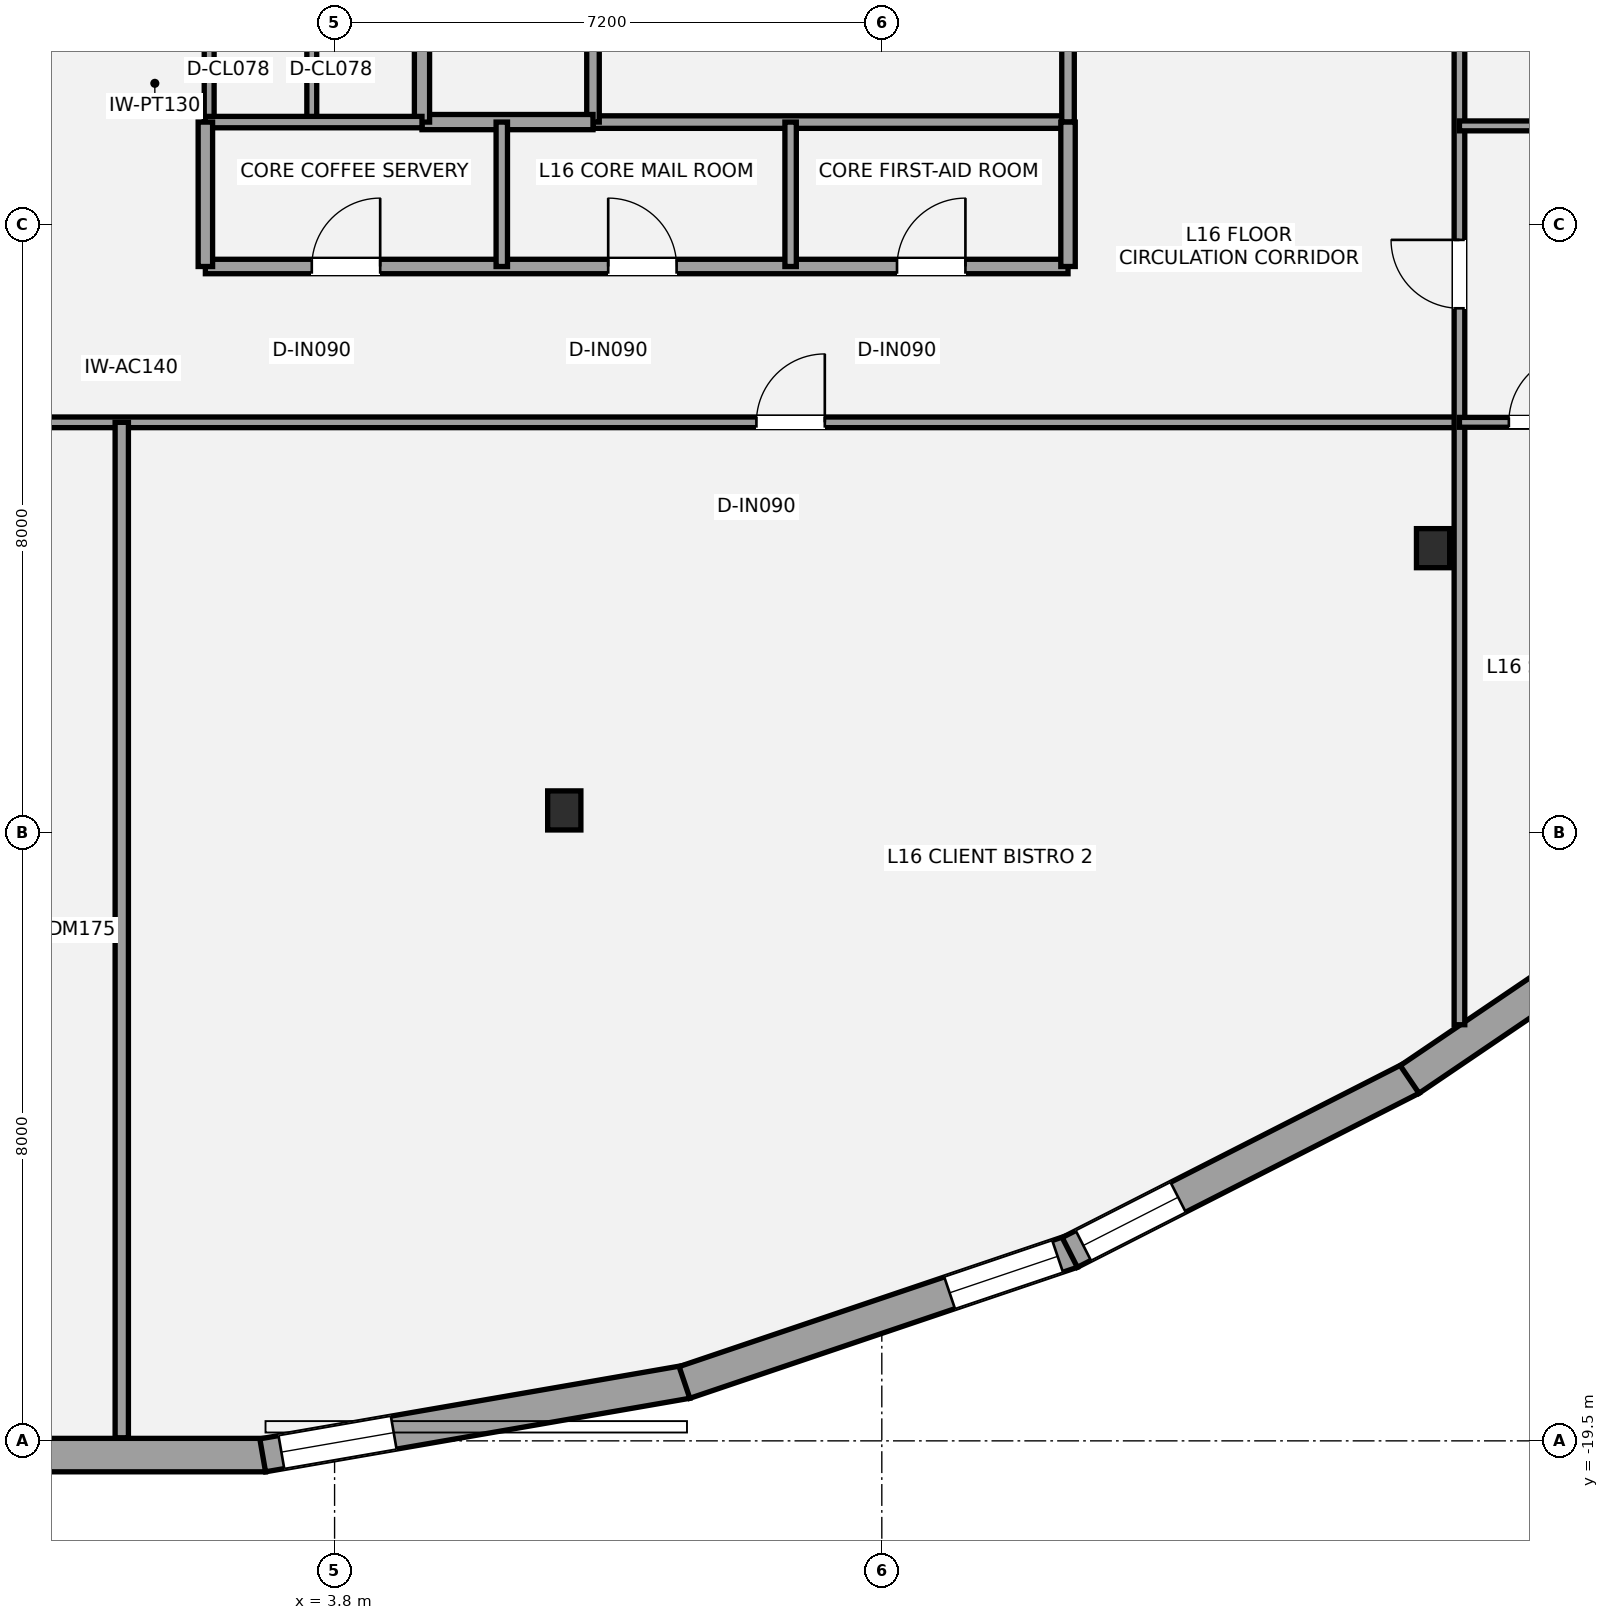
"""IFC4 building model, lengths in metres.
Left out: names, types, materials, properties, quantities, classifications, styles, units other than length and angle.
Written with IfcOpenShell. Run it as: python <this file> out.ifc"""

import sys

from ifc_helpers import new_model, si_unit, direction, frame, frame_2d, origin, origin_2d, place, context, subcontext, project, spatial, rectangle, i_section, extrude, element, fill, save


model = new_model("IFC4")
c1 = context("Model", 3, precision=1e-05, world=origin(), true_north=direction((0.0, 1.0)))
c2 = subcontext(c1, "Body", "Model", "MODEL_VIEW")
j1 = project(units=[si_unit("LENGTHUNIT", "METRE"), si_unit("PLANEANGLEUNIT", "RADIAN")], contexts=[c1])
p1 = place(None, origin())
s1 = spatial("IfcSite", under=j1, at=p1, CompositionType="ELEMENT")
p2 = place(p1, origin())
s2 = spatial("IfcBuilding", under=s1, at=p2, CompositionType="ELEMENT")
p3 = place(p2, frame((0.0, 0.0, 63.0)))
s3 = spatial("IfcBuildingStorey", under=s2, at=p3, CompositionType="ELEMENT", Elevation=63.0)
for number, where, z_axis, x_axis in (
    (1, (6.822, -11.206, 0.0), (0.0, 0.0, 1.0), (1.0, 0.0, 0.0)),
    (2, (18.253, -7.756, 0.0), (0.0, 0.0, 1.0), (1.0, 0.0, 0.0)),
):
    element("IfcColumn", number, at=place(p3, frame(where, z_axis=z_axis, x_axis=x_axis)), inside=s3, PredefinedType="COLUMN", context=c2, shape_type="SweptSolid", body=[
        extrude(i_section(OverallWidth=0.437, OverallDepth=0.514, WebThickness=0.061, FlangeThickness=0.097, at=origin_2d()), origin(), (0.0, 0.0, 1.0), 3.6),
    ])
p4 = place(p3, frame((2.892, -19.687, 0.0), z_axis=(0.0, 0.0, 1.0), x_axis=(-1.0, 0.0, 0.0)))
e3 = element("IfcWall", 3, at=p4, inside=s3, PredefinedType="STANDARD", context=c2, shape_type="SweptSolid", body=[
    extrude(rectangle(XDim=5.784, YDim=0.44, at=frame_2d((2.892, 0.0))), origin(), (0.0, 0.0, 1.0), 2.529),
])
p5 = place(p4, frame((4.034, 0.0, 0.65)))
e4 = element("IfcOpeningElement", 4, at=p5, cuts=e3, PredefinedType="OPENING", context=c2, shape_type="SweptSolid", body=[
    extrude(rectangle(XDim=1.5, YDim=1.7, at=frame_2d((0.75, 0.85))), frame((0.0, 0.23, 0.0), z_axis=(0.0, -1.0, 0.0), x_axis=(1.0, 0.0, 0.0)), (0.0, 0.0, 1.0), 0.46),
])
p6 = place(p3, frame((8.436, -18.723, 0.0), z_axis=(0.0, 0.0, 1.0), x_axis=(-0.985308697227, -0.170782818716, 0.0)))
e5 = element("IfcWall", 5, at=p6, inside=s3, PredefinedType="STANDARD", context=c2, shape_type="SweptSolid", body=[
    extrude(rectangle(XDim=5.665, YDim=0.44, at=frame_2d((2.833, 0.0))), origin(), (0.0, 0.0, 1.0), 2.529),
])
p7 = place(p6, frame((3.916, 0.0, 0.65)))
e6 = element("IfcOpeningElement", 6, at=p7, cuts=e5, PredefinedType="OPENING", context=c2, shape_type="SweptSolid", body=[
    extrude(rectangle(XDim=1.5, YDim=1.7, at=frame_2d((0.75, 0.85))), frame((0.0, 0.23, 0.0), z_axis=(0.0, -1.0, 0.0), x_axis=(1.0, 0.0, 0.0)), (0.0, 0.0, 1.0), 0.46),
])
p8 = place(p3, frame((13.502, -17.008, 0.0), z_axis=(0.0, 0.0, 1.0), x_axis=(-0.947368862969, -0.320144088616, 0.0)))
e7 = element("IfcWall", 7, at=p8, inside=s3, PredefinedType="STANDARD", context=c2, shape_type="SweptSolid", body=[
    extrude(rectangle(XDim=5.382, YDim=0.44, at=frame_2d((2.691, 0.0))), origin(), (0.0, 0.0, 1.0), 2.529),
])
p9 = place(p8, frame((0.2, 0.0, 0.48)))
e8 = element("IfcOpeningElement", 8, at=p9, cuts=e7, PredefinedType="OPENING", context=c2, shape_type="SweptSolid", body=[
    extrude(rectangle(XDim=1.5, YDim=1.7, at=frame_2d((0.75, 0.85))), frame((0.0, 0.23, 0.0), z_axis=(0.0, -1.0, 0.0), x_axis=(1.0, 0.0, 0.0)), (0.0, 0.0, 1.0), 0.46),
])
p10 = place(p3, frame((17.968, -14.731, 0.0), z_axis=(0.0, 0.0, 1.0), x_axis=(-0.891072734441, -0.45386053137, 0.0)))
e9 = element("IfcWall", 9, at=p10, inside=s3, PredefinedType="STANDARD", context=c2, shape_type="SweptSolid", body=[
    extrude(rectangle(XDim=5.045, YDim=0.44, at=frame_2d((2.522, 0.0))), origin(), (0.0, 0.0, 1.0), 2.529),
])
p11 = place(p10, frame((3.445, 0.0, 0.58)))
e10 = element("IfcOpeningElement", 10, at=p11, cuts=e9, PredefinedType="OPENING", context=c2, shape_type="SweptSolid", body=[
    extrude(rectangle(XDim=1.4, YDim=1.55, at=frame_2d((0.7, 0.775))), frame((0.0, 0.23, 0.0), z_axis=(0.0, -1.0, 0.0), x_axis=(1.0, 0.0, 0.0)), (0.0, 0.0, 1.0), 0.46),
])
p12 = place(p3, frame((21.893, -12.068, 0.0), z_axis=(0.0, 0.0, 1.0), x_axis=(-0.827693991977, -0.561179699959, 0.0)))
e11 = element("IfcWall", 11, at=p12, inside=s3, PredefinedType="STANDARD", context=c2, shape_type="SweptSolid", body=[
    extrude(rectangle(XDim=4.77, YDim=0.44, at=frame_2d((2.385, 0.0))), origin(), (0.0, 0.0, 1.0), 2.529),
])
p13 = place(p12, frame((0.646, 0.0, 0.58)))
e12 = element("IfcOpeningElement", 12, at=p13, cuts=e11, PredefinedType="OPENING", context=c2, shape_type="SweptSolid", body=[
    extrude(rectangle(XDim=0.9, YDim=1.35, at=frame_2d((0.45, 0.675))), frame((0.0, 0.23, 0.0), z_axis=(0.0, -1.0, 0.0), x_axis=(1.0, 0.0, 0.0)), (0.0, 0.0, 1.0), 0.46),
])
p14 = place(p3, frame((7.2, -2.15, 0.0), z_axis=(0.0, 0.0, 1.0), x_axis=(1.0, 0.0, 0.0)))
e13 = element("IfcWall", 13, at=p14, inside=s3, PredefinedType="PARTITIONING", context=c2, shape_type="SweptSolid", body=[
    extrude(rectangle(XDim=6.25, YDim=0.165, at=frame_2d((3.125, 0.0))), origin(), (0.0, 0.0, 1.0), 3.4),
])
p15 = place(p3, frame((7.2, -2.15, 0.0), z_axis=(0.0, 0.0, 1.0), x_axis=(0.0, 1.0, 0.0)))
e14 = element("IfcWall", 14, at=p15, inside=s3, PredefinedType="PARTITIONING", context=c2, shape_type="SweptSolid", body=[
    extrude(rectangle(XDim=3.15, YDim=0.165, at=frame_2d((1.575, 0.0))), origin(), (0.0, 0.0, 1.0), 2.853),
])
p16 = place(p3, frame((13.45, -2.15, 0.0), z_axis=(0.0, 0.0, 1.0), x_axis=(0.0, 1.0, 0.0)))
e15 = element("IfcWall", 15, at=p16, inside=s3, PredefinedType="PARTITIONING", context=c2, shape_type="SweptSolid", body=[
    extrude(rectangle(XDim=3.15, YDim=0.165, at=frame_2d((1.575, 0.0))), origin(), (0.0, 0.0, 1.0), 2.853),
])
p17 = place(p16, frame((1.15, 0.0, 0.0)))
e16 = element("IfcOpeningElement", 16, at=p17, cuts=e15, PredefinedType="OPENING", context=c2, shape_type="SweptSolid", body=[
    extrude(rectangle(XDim=1.05, YDim=2.15, at=frame_2d((0.525, 1.075))), frame((0.0, 0.093, 0.0), z_axis=(0.0, -1.0, 0.0), x_axis=(1.0, 0.0, 0.0)), (0.0, 0.0, 1.0), 0.185),
])
p18 = place(p3, frame((4.95, -2.15, 0.0), z_axis=(0.0, 0.0, 1.0), x_axis=(1.0, 0.0, 0.0)))
e17 = element("IfcWall", 17, at=p18, inside=s3, PredefinedType="SOLIDWALL", context=c2, shape_type="SweptSolid", body=[
    extrude(rectangle(XDim=2.25, YDim=0.2, at=frame_2d((1.125, 0.0))), origin(), (0.0, 0.0, 1.0), 3.4),
])
p19 = place(p3, frame((4.95, -2.15, 0.0), z_axis=(0.0, 0.0, 1.0), x_axis=(0.0, 1.0, 0.0)))
e18 = element("IfcWall", 18, at=p19, inside=s3, PredefinedType="SOLIDWALL", context=c2, shape_type="SweptSolid", body=[
    extrude(rectangle(XDim=3.15, YDim=0.2, at=frame_2d((1.575, 0.0))), origin(), (0.0, 0.0, 1.0), 2.853),
])
p20 = place(p19, frame((0.95, 0.0, 0.0)))
e19 = element("IfcOpeningElement", 19, at=p20, cuts=e18, PredefinedType="OPENING", context=c2, shape_type="SweptSolid", body=[
    extrude(rectangle(XDim=0.75, YDim=2.1, at=frame_2d((0.375, 1.05))), frame((0.0, 0.11, 0.0), z_axis=(0.0, -1.0, 0.0), x_axis=(1.0, 0.0, 0.0)), (0.0, 0.0, 1.0), 0.22),
])
for number, where, z_axis, x_axis in (
    (20, (2.15, -2.15, 0.0), (0.0, 0.0, 1.0), (0.0, 1.0, 0.0)),
    (21, (3.5, -2.15, 0.0), (0.0, 0.0, 1.0), (0.0, 1.0, 0.0)),
):
    element("IfcWall", number, at=place(p3, frame(where, z_axis=z_axis, x_axis=x_axis)), inside=s3, PredefinedType="PARTITIONING", context=c2, shape_type="SweptSolid", body=[
        extrude(rectangle(XDim=1.8, YDim=0.13, at=frame_2d((0.9, 0.0))), origin(), (0.0, 0.0, 1.0), 3.4),
    ])
p21 = place(p3, frame((2.1, -4.05, 0.0), z_axis=(0.0, 0.0, 1.0), x_axis=(1.0, 0.0, 0.0)))
e22 = element("IfcWall", 22, at=p21, inside=s3, PredefinedType="PLUMBINGWALL", context=c2, shape_type="SweptSolid", body=[
    extrude(rectangle(XDim=11.35, YDim=0.19, at=frame_2d((5.675, 0.0))), origin(), (0.0, 0.0, 1.0), 2.933),
])
p22 = place(p21, frame((1.4, 0.0, 0.0)))
e23 = element("IfcOpeningElement", 23, at=p22, cuts=e22, PredefinedType="OPENING", context=c2, shape_type="SweptSolid", body=[
    extrude(rectangle(XDim=0.9, YDim=2.1, at=frame_2d((0.45, 1.05))), frame((0.0, 0.105, 0.0), z_axis=(0.0, -1.0, 0.0), x_axis=(1.0, 0.0, 0.0)), (0.0, 0.0, 1.0), 0.21),
])
p23 = place(p21, frame((5.3, 0.0, 0.0)))
e24 = element("IfcOpeningElement", 24, at=p23, cuts=e22, PredefinedType="OPENING", context=c2, shape_type="SweptSolid", body=[
    extrude(rectangle(XDim=0.9, YDim=2.1, at=frame_2d((0.45, 1.05))), frame((0.0, 0.105, 0.0), z_axis=(0.0, -1.0, 0.0), x_axis=(1.0, 0.0, 0.0)), (0.0, 0.0, 1.0), 0.21),
])
p24 = place(p21, frame((9.1, 0.0, 0.0)))
e25 = element("IfcOpeningElement", 25, at=p24, cuts=e22, PredefinedType="OPENING", context=c2, shape_type="SweptSolid", body=[
    extrude(rectangle(XDim=0.9, YDim=2.1, at=frame_2d((0.45, 1.05))), frame((0.0, 0.105, 0.0), z_axis=(0.0, -1.0, 0.0), x_axis=(1.0, 0.0, 0.0)), (0.0, 0.0, 1.0), 0.21),
])
p25 = place(p3, frame((2.1, -2.15, 0.0), z_axis=(0.0, 0.0, 1.0), x_axis=(1.0, 0.0, 0.0)))
e26 = element("IfcWall", 26, at=p25, inside=s3, PredefinedType="PLUMBINGWALL", context=c2, shape_type="SweptSolid", body=[
    extrude(rectangle(XDim=2.85, YDim=0.15, at=frame_2d((1.425, 0.0))), origin(), (0.0, 0.0, 1.0), 3.4),
])
p26 = place(p3, frame((2.1, -4.05, 0.0), z_axis=(0.0, 0.0, 1.0), x_axis=(0.0, 1.0, 0.0)))
e27 = element("IfcWall", 27, at=p26, inside=s3, PredefinedType="PLUMBINGWALL", context=c2, shape_type="SweptSolid", body=[
    extrude(rectangle(XDim=1.9, YDim=0.19, at=frame_2d((0.95, 0.0))), origin(), (0.0, 0.0, 1.0), 3.4),
])
p27 = place(p3, frame((13.45, -4.05, 0.0), z_axis=(0.0, 0.0, 1.0), x_axis=(0.0, 1.0, 0.0)))
e28 = element("IfcWall", 28, at=p27, inside=s3, PredefinedType="PLUMBINGWALL", context=c2, shape_type="SweptSolid", body=[
    extrude(rectangle(XDim=1.9, YDim=0.19, at=frame_2d((0.95, 0.0))), origin(), (0.0, 0.0, 1.0), 2.853),
])
p28 = place(p3, frame((6.0, -4.05, 0.0), z_axis=(0.0, 0.0, 1.0), x_axis=(0.0, 1.0, 0.0)))
e29 = element("IfcWall", 29, at=p28, inside=s3, PredefinedType="PLUMBINGWALL", context=c2, shape_type="SweptSolid", body=[
    extrude(rectangle(XDim=1.9, YDim=0.15, at=frame_2d((0.95, 0.0))), origin(), (0.0, 0.0, 1.0), 2.841),
])
p29 = place(p3, frame((9.8, -4.05, 0.0), z_axis=(0.0, 0.0, 1.0), x_axis=(0.0, 1.0, 0.0)))
e30 = element("IfcWall", 30, at=p29, inside=s3, PredefinedType="PLUMBINGWALL", context=c2, shape_type="SweptSolid", body=[
    extrude(rectangle(XDim=1.9, YDim=0.15, at=frame_2d((0.95, 0.0))), origin(), (0.0, 0.0, 1.0), 3.4),
])
p30 = place(p3, frame((-16.1, -6.1, 0.0), z_axis=(0.0, 0.0, 1.0), x_axis=(1.0, 0.0, 0.0)))
e31 = element("IfcWall", 31, at=p30, inside=s3, PredefinedType="PARTITIONING", context=c2, shape_type="SweptSolid", body=[
    extrude(rectangle(XDim=34.7, YDim=0.14, at=frame_2d((17.35, 0.0))), origin(), (0.0, 0.0, 1.0), 3.4),
])
p31 = place(p30, frame((8.1, 0.0, 0.0)))
e32 = element("IfcOpeningElement", 32, at=p31, cuts=e31, PredefinedType="OPENING", context=c2, shape_type="SweptSolid", body=[
    extrude(rectangle(XDim=0.9, YDim=2.1, at=frame_2d((0.45, 1.05))), frame((0.0, 0.08, 0.0), z_axis=(0.0, -1.0, 0.0), x_axis=(1.0, 0.0, 0.0)), (0.0, 0.0, 1.0), 0.16),
])
p32 = place(p30, frame((25.45, 0.0, 0.0)))
e33 = element("IfcOpeningElement", 33, at=p32, cuts=e31, PredefinedType="OPENING", context=c2, shape_type="SweptSolid", body=[
    extrude(rectangle(XDim=0.9, YDim=2.1, at=frame_2d((0.45, 1.05))), frame((0.0, 0.08, 0.0), z_axis=(0.0, -1.0, 0.0), x_axis=(1.0, 0.0, 0.0)), (0.0, 0.0, 1.0), 0.16),
])
p33 = place(p3, frame((18.6, -14.025, 0.0), z_axis=(0.0, 0.0, 1.0), x_axis=(0.0, 1.0, 0.0)))
e34 = element("IfcWall", 34, at=p33, inside=s3, PredefinedType="PARTITIONING", context=c2, shape_type="SweptSolid", body=[
    extrude(rectangle(XDim=19.875, YDim=0.14, at=frame_2d((9.938, 0.0))), origin(), (0.0, 0.0, 1.0), 2.779),
])
p34 = place(p33, frame((9.426, 0.0, 0.0)))
e35 = element("IfcOpeningElement", 35, at=p34, cuts=e34, PredefinedType="OPENING", context=c2, shape_type="SweptSolid", body=[
    extrude(rectangle(XDim=0.9, YDim=2.1, at=frame_2d((0.45, 1.05))), frame((0.0, 0.08, 0.0), z_axis=(0.0, -1.0, 0.0), x_axis=(1.0, 0.0, 0.0)), (0.0, 0.0, 1.0), 0.16),
])
p35 = place(p33, frame((13.676, 0.0, 0.0)))
e36 = element("IfcOpeningElement", 36, at=p35, cuts=e34, PredefinedType="OPENING", context=c2, shape_type="SweptSolid", body=[
    extrude(rectangle(XDim=0.9, YDim=2.1, at=frame_2d((0.45, 1.05))), frame((0.0, 0.08, 0.0), z_axis=(0.0, -1.0, 0.0), x_axis=(1.0, 0.0, 0.0)), (0.0, 0.0, 1.0), 0.16),
])
p36 = place(p33, frame((17.701, 0.0, 0.0)))
e37 = element("IfcOpeningElement", 37, at=p36, cuts=e34, PredefinedType="OPENING", context=c2, shape_type="SweptSolid", body=[
    extrude(rectangle(XDim=0.9, YDim=2.1, at=frame_2d((0.45, 1.05))), frame((0.0, 0.08, 0.0), z_axis=(0.0, -1.0, 0.0), x_axis=(1.0, 0.0, 0.0)), (0.0, 0.0, 1.0), 0.16),
])
p37 = place(p3, frame((1.0, -19.459, 0.0), z_axis=(0.0, 0.0, 1.0), x_axis=(0.0, 1.0, 0.0)))
e38 = element("IfcWall", 38, at=p37, inside=s3, PredefinedType="PARTITIONING", context=c2, shape_type="SweptSolid", body=[
    extrude(rectangle(XDim=13.359, YDim=0.175, at=frame_2d((6.68, 0.0))), origin(), (0.0, 0.0, 1.0), 3.4),
])
p38 = place(p3, frame((18.6, -6.1, 0.0), z_axis=(0.0, 0.0, 1.0), x_axis=(1.0, 0.0, 0.0)))
e39 = element("IfcWall", 39, at=p38, inside=s3, PredefinedType="PARTITIONING", context=c2, shape_type="SweptSolid", body=[
    extrude(rectangle(XDim=8.517, YDim=0.13, at=frame_2d((4.259, 0.0))), origin(), (0.0, 0.0, 1.0), 2.779),
])
p39 = place(p38, frame((0.65, 0.0, 0.0)))
e40 = element("IfcOpeningElement", 40, at=p39, cuts=e39, PredefinedType="OPENING", context=c2, shape_type="SweptSolid", body=[
    extrude(rectangle(XDim=0.9, YDim=2.1, at=frame_2d((0.45, 1.05))), frame((0.0, 0.075, 0.0), z_axis=(0.0, -1.0, 0.0), x_axis=(1.0, 0.0, 0.0)), (0.0, 0.0, 1.0), 0.15),
])
p40 = place(p3, frame((18.6, -2.2, 0.0), z_axis=(0.0, 0.0, 1.0), x_axis=(1.0, 0.0, 0.0)))
e41 = element("IfcWall", 41, at=p40, inside=s3, PredefinedType="PARTITIONING", context=c2, shape_type="SweptSolid", body=[
    extrude(rectangle(XDim=10.192, YDim=0.13, at=frame_2d((5.096, 0.0))), origin(), (0.0, 0.0, 1.0), 2.841),
])
p41 = place(p7, origin())
e42 = element("IfcWindow", 42, at=p41, inside=s3, PartitioningType="SINGLE_PANEL", PredefinedType="WINDOW", context=c2, shape_type="SweptSolid", body=[
    extrude(rectangle(XDim=1.5, YDim=1.7, at=frame_2d((0.75, 0.85))), frame((0.0, -0.01, 0.0), z_axis=(0.0, -1.0, 0.0), x_axis=(1.0, 0.0, 0.0)), (0.0, 0.0, 1.0), 0.06),
])
fill(e6, e42)
p42 = place(p9, origin())
e43 = element("IfcWindow", 43, at=p42, inside=s3, PartitioningType="SINGLE_PANEL", PredefinedType="WINDOW", context=c2, shape_type="SweptSolid", body=[
    extrude(rectangle(XDim=1.5, YDim=1.7, at=frame_2d((0.75, 0.85))), frame((0.0, -0.01, 0.0), z_axis=(0.0, -1.0, 0.0), x_axis=(1.0, 0.0, 0.0)), (0.0, 0.0, 1.0), 0.06),
])
fill(e8, e43)
p43 = place(p11, origin())
e44 = element("IfcWindow", 44, at=p43, inside=s3, PartitioningType="SINGLE_PANEL", PredefinedType="WINDOW", context=c2, shape_type="SweptSolid", body=[
    extrude(rectangle(XDim=1.4, YDim=1.55, at=frame_2d((0.7, 0.775))), frame((0.0, -0.01, 0.0), z_axis=(0.0, -1.0, 0.0), x_axis=(1.0, 0.0, 0.0)), (0.0, 0.0, 1.0), 0.06),
])
fill(e10, e44)
p44 = place(p22, origin())
e45 = element("IfcDoor", 45, at=p44, inside=s3, OperationType="SINGLE_SWING_RIGHT", PredefinedType="DOOR", context=c2, shape_type="SweptSolid", body=[
    extrude(rectangle(XDim=0.9, YDim=2.1, at=frame_2d((0.45, 1.05))), frame((0.0, 0.025, 0.0), z_axis=(0.0, -1.0, 0.0), x_axis=(1.0, 0.0, 0.0)), (0.0, 0.0, 1.0), 0.05),
])
fill(e23, e45)
p45 = place(p23, origin())
e46 = element("IfcDoor", 46, at=p45, inside=s3, OperationType="SINGLE_SWING_LEFT", PredefinedType="DOOR", context=c2, shape_type="SweptSolid", body=[
    extrude(rectangle(XDim=0.9, YDim=2.1, at=frame_2d((0.45, 1.05))), frame((0.0, 0.025, 0.0), z_axis=(0.0, -1.0, 0.0), x_axis=(1.0, 0.0, 0.0)), (0.0, 0.0, 1.0), 0.05),
])
fill(e24, e46)
p46 = place(p24, origin())
e47 = element("IfcDoor", 47, at=p46, inside=s3, OperationType="SINGLE_SWING_RIGHT", PredefinedType="DOOR", context=c2, shape_type="SweptSolid", body=[
    extrude(rectangle(XDim=0.9, YDim=2.1, at=frame_2d((0.45, 1.05))), frame((0.0, 0.025, 0.0), z_axis=(0.0, -1.0, 0.0), x_axis=(1.0, 0.0, 0.0)), (0.0, 0.0, 1.0), 0.05),
])
fill(e25, e47)
p47 = place(p32, origin())
e48 = element("IfcDoor", 48, at=p47, inside=s3, OperationType="SINGLE_SWING_RIGHT", PredefinedType="DOOR", context=c2, shape_type="SweptSolid", body=[
    extrude(rectangle(XDim=0.9, YDim=2.1, at=frame_2d((0.45, 1.05))), frame((0.0, 0.025, 0.0), z_axis=(0.0, -1.0, 0.0), x_axis=(1.0, 0.0, 0.0)), (0.0, 0.0, 1.0), 0.05),
])
fill(e33, e48)
p48 = place(p39, origin())
e49 = element("IfcDoor", 49, at=p48, inside=s3, OperationType="SINGLE_SWING_RIGHT", PredefinedType="DOOR", context=c2, shape_type="SweptSolid", body=[
    extrude(rectangle(XDim=0.9, YDim=2.1, at=frame_2d((0.45, 1.05))), frame((0.0, 0.025, 0.0), z_axis=(0.0, -1.0, 0.0), x_axis=(1.0, 0.0, 0.0)), (0.0, 0.0, 1.0), 0.05),
])
fill(e40, e49)
p49 = place(p34, origin())
e50 = element("IfcDoor", 50, at=p49, inside=s3, OperationType="SINGLE_SWING_RIGHT", PredefinedType="DOOR", context=c2, shape_type="SweptSolid", body=[
    extrude(rectangle(XDim=0.9, YDim=2.1, at=frame_2d((0.45, 1.05))), frame((0.0, 0.025, 0.0), z_axis=(0.0, -1.0, 0.0), x_axis=(1.0, 0.0, 0.0)), (0.0, 0.0, 1.0), 0.05),
])
fill(e35, e50)
save(model, sys.argv[1])
